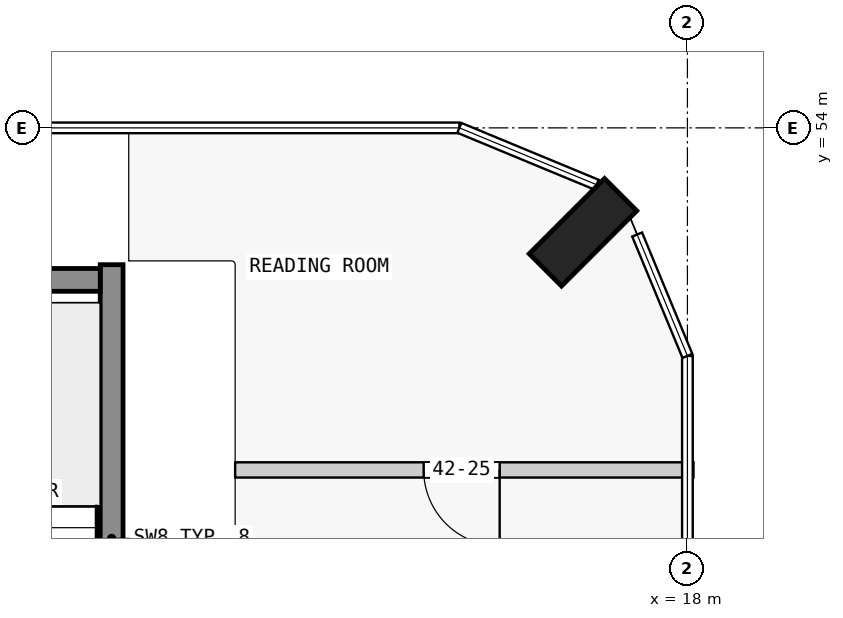
"""IFC4 building model, lengths in metres.
Left out: names, types, materials, properties, quantities, classifications, styles, units other than length and angle.
Written with IfcOpenShell. Run it as: python <this file> out.ifc"""

import sys

from ifc_helpers import new_model, si_unit, direction, frame, frame_2d, origin, origin_2d, place, context, subcontext, project, spatial, rectangle, extrude, element, fill, save


model = new_model("IFC4")
c1 = context("Model", 3, precision=1e-05, world=origin(), true_north=direction((0.0, 1.0)))
c2 = subcontext(c1, "Body", "Model", "MODEL_VIEW")
j1 = project(units=[si_unit("LENGTHUNIT", "METRE"), si_unit("PLANEANGLEUNIT", "RADIAN")], contexts=[c1])
p1 = place(None, origin())
s1 = spatial("IfcSite", under=j1, at=p1, CompositionType="ELEMENT")
p2 = place(p1, origin())
s2 = spatial("IfcBuilding", under=s1, at=p2, CompositionType="ELEMENT")
p3 = place(p2, frame((0.0, 0.0, 163.9)))
s3 = spatial("IfcBuildingStorey", under=s2, at=p3, CompositionType="ELEMENT", Elevation=163.9)
p4 = place(p3, frame((16.626, 52.626, 0.0), z_axis=(0.0, 0.0, 1.0), x_axis=(-0.707106781187, 0.707106781187, 0.0)))
e1 = element("IfcColumn", 1, at=p4, inside=s3, PredefinedType="COLUMN", context=c2, shape_type="SweptSolid", body=[
    extrude(rectangle(XDim=0.6, YDim=1.4, at=origin_2d()), origin(), (0.0, 0.0, 1.0), 3.5),
])
p5 = place(p3, frame((7.725, 52.0, 0.0), z_axis=(0.0, 0.0, 1.0), x_axis=(1.0, 0.0, 0.0)))
e2 = element("IfcWall", 2, at=p5, inside=s3, PredefinedType="SHEAR", context=c2, shape_type="SweptSolid", body=[
    extrude(rectangle(XDim=2.55, YDim=0.3, at=frame_2d((1.275, 0.0))), origin(), (0.0, 0.0, 1.0), 3.5),
])
p6 = place(p3, frame((10.425, 45.0, 0.0), z_axis=(0.0, 0.0, 1.0), x_axis=(0.0, 1.0, 0.0)))
e3 = element("IfcWall", 3, at=p6, inside=s3, PredefinedType="SHEAR", context=c2, shape_type="SweptSolid", body=[
    extrude(rectangle(XDim=7.2, YDim=0.3, at=frame_2d((3.6, 0.0))), origin(), (0.0, 0.0, 1.0), 3.5),
])
p7 = place(p3, frame((18.08, 49.5, 0.0), z_axis=(0.0, 0.0, 1.0), x_axis=(-1.0, 0.0, 0.0)))
e4 = element("IfcWall", 4, at=p7, inside=s3, PredefinedType="PARTITIONING", context=c2, shape_type="SweptSolid", body=[
    extrude(rectangle(XDim=6.03, YDim=0.2, at=frame_2d((3.015, 0.0))), origin(), (0.0, 0.0, 1.0), 3.25),
])
p8 = place(p7, frame((2.55, 0.0, 0.0)))
e5 = element("IfcOpeningElement", 5, at=p8, cuts=e4, PredefinedType="OPENING", context=c2, shape_type="SweptSolid", body=[
    extrude(rectangle(XDim=1.0, YDim=2.1, at=frame_2d((0.5, 1.05))), frame((0.0, 0.11, 0.0), z_axis=(0.0, -1.0, 0.0), x_axis=(1.0, 0.0, 0.0)), (0.0, 0.0, 1.0), 0.22),
])
p9 = place(p8, origin())
e6 = element("IfcDoor", 6, at=p9, inside=s3, OperationType="SINGLE_SWING_RIGHT", PredefinedType="DOOR", context=c2, shape_type="SweptSolid", body=[
    extrude(rectangle(XDim=1.0, YDim=2.1, at=frame_2d((0.5, 1.05))), frame((0.0, 0.025, 0.0), z_axis=(0.0, -1.0, 0.0), x_axis=(1.0, 0.0, 0.0)), (0.0, 0.0, 1.0), 0.05),
])
fill(e5, e6)
save(model, sys.argv[1])
